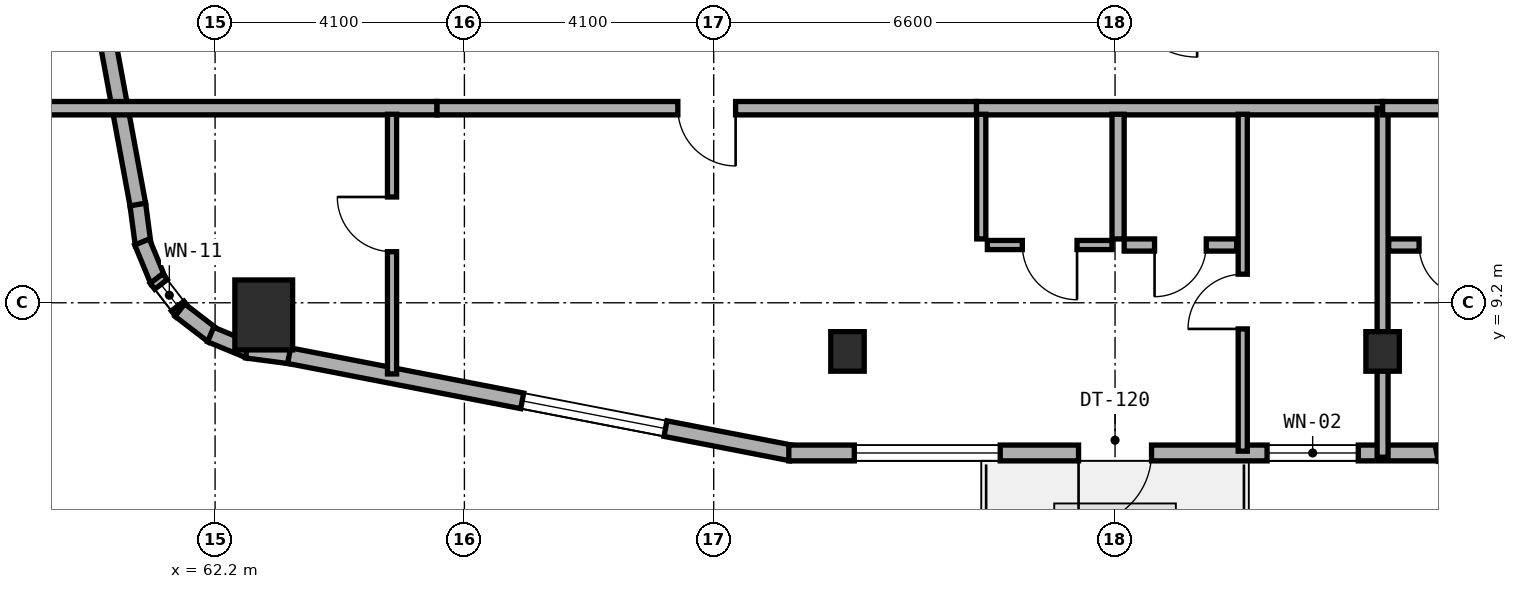
"""IFC4 building model, lengths in metres.
Left out: names, types, materials, properties, quantities, classifications, styles, units other than length and angle.
Written with IfcOpenShell. Run it as: python <this file> out.ifc"""

import sys

from ifc_helpers import new_model, si_unit, direction, frame, frame_2d, origin, origin_2d, place, context, subcontext, project, spatial, rectangle, extrude, element, fill, save


model = new_model("IFC4")
c1 = context("Model", 3, precision=1e-05, world=origin(), true_north=direction((0.0, 1.0)))
c2 = subcontext(c1, "Body", "Model", "MODEL_VIEW")
j1 = project(units=[si_unit("LENGTHUNIT", "METRE"), si_unit("PLANEANGLEUNIT", "RADIAN")], contexts=[c1])
p1 = place(None, origin())
s1 = spatial("IfcSite", under=j1, at=p1, CompositionType="ELEMENT")
p2 = place(p1, origin())
s2 = spatial("IfcBuilding", under=s1, at=p2, CompositionType="ELEMENT")
p3 = place(p2, frame((0.0, 0.0, 112.5)))
s3 = spatial("IfcBuildingStorey", under=s2, at=p3, CompositionType="ELEMENT", Elevation=112.5)
for number, where, z_axis, x_axis in (
    (1, (72.6, 8.4, 0.0), (0.0, 0.0, 1.0), (1.0, 0.0, 0.0)),
    (2, (81.4, 8.4, 0.0), (0.0, 0.0, 1.0), (1.0, 0.0, 0.0)),
):
    element("IfcColumn", number, at=place(p3, frame(where, z_axis=z_axis, x_axis=x_axis)), inside=s3, PredefinedType="COLUMN", context=c2, shape_type="SweptSolid", body=[
        extrude(rectangle(XDim=0.55, YDim=0.65, at=origin_2d()), origin(), (0.0, 0.0, 1.0), 3.5),
    ])
p4 = place(p3, frame((63.0, 9.0, 0.0), z_axis=(0.0, 0.0, 1.0), x_axis=(1.0, 0.0, 0.0)))
e3 = element("IfcColumn", 3, at=p4, inside=s3, PredefinedType="COLUMN", context=c2, shape_type="SweptSolid", body=[
    extrude(rectangle(XDim=0.95, YDim=1.15, at=origin_2d()), origin(), (0.0, 0.0, 1.0), 3.5),
])
p5 = place(p3, frame((60.928, 10.825, 0.0), z_axis=(0.0, 0.0, 1.0), x_axis=(0.131667498923, -0.991293937098, 0.0)))
e4 = element("IfcWall", 4, at=p5, inside=s3, PredefinedType="STANDARD", context=c2, shape_type="SweptSolid", body=[
    extrude(rectangle(XDim=0.677, YDim=0.26, at=frame_2d((0.338, 0.0))), origin(), (0.0, 0.0, 1.0), 3.25),
])
p6 = place(p3, frame((60.999, 10.2, 0.0), z_axis=(0.0, 0.0, 1.0), x_axis=(0.381988976935, -0.924166879681, 0.0)))
e5 = element("IfcWall", 5, at=p6, inside=s3, PredefinedType="STANDARD", context=c2, shape_type="SweptSolid", body=[
    extrude(rectangle(XDim=0.693, YDim=0.26, at=frame_2d((0.347, 0.0))), origin(), (0.0, 0.0, 1.0), 3.25),
])
p7 = place(p3, frame((61.236, 9.599, 0.0), z_axis=(0.0, 0.0, 1.0), x_axis=(0.609472651958, -0.792807092876, 0.0)))
e6 = element("IfcWall", 6, at=p7, inside=s3, PredefinedType="STANDARD", context=c2, shape_type="SweptSolid", body=[
    extrude(rectangle(XDim=0.694, YDim=0.26, at=frame_2d((0.347, 0.0))), origin(), (0.0, 0.0, 1.0), 3.25),
])
p8 = place(p7, frame((0.122, 0.0, 0.85)))
e7 = element("IfcOpeningElement", 7, at=p8, cuts=e6, PredefinedType="OPENING", context=c2, shape_type="SweptSolid", body=[
    extrude(rectangle(XDim=0.45, YDim=1.5, at=frame_2d((0.225, 0.75))), frame((0.0, 0.14, 0.0), z_axis=(0.0, -1.0, 0.0), x_axis=(1.0, 0.0, 0.0)), (0.0, 0.0, 1.0), 0.28),
])
p9 = place(p3, frame((61.621, 9.08, 0.0), z_axis=(0.0, 0.0, 1.0), x_axis=(0.792506234191, -0.609863811657, 0.0)))
e8 = element("IfcWall", 8, at=p9, inside=s3, PredefinedType="STANDARD", context=c2, shape_type="SweptSolid", body=[
    extrude(rectangle(XDim=0.694, YDim=0.26, at=frame_2d((0.347, 0.0))), origin(), (0.0, 0.0, 1.0), 3.25),
])
p10 = place(p3, frame((62.127, 8.678, 0.0), z_axis=(0.0, 0.0, 1.0), x_axis=(0.92421822618, -0.381864727877, 0.0)))
e9 = element("IfcWall", 9, at=p10, inside=s3, PredefinedType="STANDARD", context=c2, shape_type="SweptSolid", body=[
    extrude(rectangle(XDim=0.694, YDim=0.26, at=frame_2d((0.347, 0.0))), origin(), (0.0, 0.0, 1.0), 3.25),
])
p11 = place(p3, frame((62.719, 8.421, 0.0), z_axis=(0.0, 0.0, 1.0), x_axis=(0.991433279471, -0.130614135366, 0.0)))
e10 = element("IfcWall", 10, at=p11, inside=s3, PredefinedType="STANDARD", context=c2, shape_type="SweptSolid", body=[
    extrude(rectangle(XDim=0.712, YDim=0.26, at=frame_2d((0.356, 0.0))), origin(), (0.0, 0.0, 1.0), 3.25),
])
p12 = place(p3, frame((63.417, 8.33, 0.0), z_axis=(0.0, 0.0, 1.0), x_axis=(0.98174070399, -0.190224052445, 0.0)))
e11 = element("IfcWall", 11, at=p12, inside=s3, PredefinedType="STANDARD", context=c2, shape_type="SweptSolid", body=[
    extrude(rectangle(XDim=8.412, YDim=0.26, at=frame_2d((4.206, 0.0))), origin(), (0.0, 0.0, 1.0), 3.25),
])
p13 = place(p12, frame((3.905, 0.0, 0.8)))
e12 = element("IfcOpeningElement", 12, at=p13, cuts=e11, PredefinedType="OPENING", context=c2, shape_type="SweptSolid", body=[
    extrude(rectangle(XDim=2.4, YDim=1.6, at=frame_2d((1.2, 0.8))), frame((0.0, 0.14, 0.0), z_axis=(0.0, -1.0, 0.0), x_axis=(1.0, 0.0, 0.0)), (0.0, 0.0, 1.0), 0.28),
])
p14 = place(p3, frame((71.635, 6.73, 0.0), z_axis=(0.0, 0.0, 1.0), x_axis=(1.0, 0.0, 0.0)))
e13 = element("IfcWall", 13, at=p14, inside=s3, PredefinedType="STANDARD", context=c2, shape_type="SweptSolid", body=[
    extrude(rectangle(XDim=10.695, YDim=0.26, at=frame_2d((5.348, 0.0))), origin(), (0.0, 0.0, 1.0), 3.25),
])
p15 = place(p14, frame((4.765, 0.0, 0.0)))
e14 = element("IfcOpeningElement", 14, at=p15, cuts=e13, PredefinedType="OPENING", context=c2, shape_type="SweptSolid", body=[
    extrude(rectangle(XDim=1.2, YDim=2.15, at=frame_2d((0.6, 1.075))), frame((0.0, 0.14, 0.0), z_axis=(0.0, -1.0, 0.0), x_axis=(1.0, 0.0, 0.0)), (0.0, 0.0, 1.0), 0.28),
])
p16 = place(p14, frame((1.077, 0.0, 0.8)))
e15 = element("IfcOpeningElement", 15, at=p16, cuts=e13, PredefinedType="OPENING", context=c2, shape_type="SweptSolid", body=[
    extrude(rectangle(XDim=2.4, YDim=1.6, at=frame_2d((1.2, 0.8))), frame((0.0, 0.14, 0.0), z_axis=(0.0, -1.0, 0.0), x_axis=(1.0, 0.0, 0.0)), (0.0, 0.0, 1.0), 0.28),
])
p17 = place(p14, frame((7.865, 0.0, 0.85)))
e16 = element("IfcOpeningElement", 16, at=p17, cuts=e13, PredefinedType="OPENING", context=c2, shape_type="SweptSolid", body=[
    extrude(rectangle(XDim=1.5, YDim=1.5, at=frame_2d((0.75, 0.75))), frame((0.0, 0.14, 0.0), z_axis=(0.0, -1.0, 0.0), x_axis=(1.0, 0.0, 0.0)), (0.0, 0.0, 1.0), 0.28),
])
p18 = place(p3, frame((82.29, 6.723, 0.0), z_axis=(0.0, 0.0, 1.0), x_axis=(0.981733729692, 0.190260043057, 0.0)))
e17 = element("IfcWall", 17, at=p18, inside=s3, PredefinedType="STANDARD", context=c2, shape_type="SweptSolid", body=[
    extrude(rectangle(XDim=8.447, YDim=0.26, at=frame_2d((4.224, 0.0))), origin(), (0.0, 0.0, 1.0), 3.25),
])
p19 = place(p18, frame((2.608, 0.0, 0.8)))
e18 = element("IfcOpeningElement", 18, at=p19, cuts=e17, PredefinedType="OPENING", context=c2, shape_type="SweptSolid", body=[
    extrude(rectangle(XDim=2.4, YDim=1.6, at=frame_2d((1.2, 0.8))), frame((0.0, 0.14, 0.0), z_axis=(0.0, -1.0, 0.0), x_axis=(1.0, 0.0, 0.0)), (0.0, 0.0, 1.0), 0.28),
])
p20 = place(p3, frame((59.318, 19.558, 0.0), z_axis=(0.0, 0.0, 1.0), x_axis=(0.181209963057, -0.983444431215, 0.0)))
e19 = element("IfcWall", 19, at=p20, inside=s3, PredefinedType="STANDARD", context=c2, shape_type="SweptSolid", body=[
    extrude(rectangle(XDim=8.889, YDim=0.26, at=frame_2d((4.445, 0.0))), origin(), (0.0, 0.0, 1.0), 3.25),
])
p21 = place(p20, frame((1.444, 0.0, 0.8)))
e20 = element("IfcOpeningElement", 20, at=p21, cuts=e19, PredefinedType="OPENING", context=c2, shape_type="SweptSolid", body=[
    extrude(rectangle(XDim=2.4, YDim=1.6, at=frame_2d((1.2, 0.8))), frame((0.0, 0.14, 0.0), z_axis=(0.0, -1.0, 0.0), x_axis=(1.0, 0.0, 0.0)), (0.0, 0.0, 1.0), 0.28),
])
p22 = place(p3, frame((59.36, 12.4, 0.0), z_axis=(0.0, 0.0, 1.0), x_axis=(1.0, 0.0, 0.0)))
e21 = element("IfcWall", 21, at=p22, inside=s3, PredefinedType="SOLIDWALL", context=c2, shape_type="SweptSolid", body=[
    extrude(rectangle(XDim=6.49, YDim=0.22, at=frame_2d((3.245, 0.0))), origin(), (0.0, 0.0, 1.0), 2.945),
])
p23 = place(p3, frame((74.72, 12.4, 0.0), z_axis=(0.0, 0.0, 1.0), x_axis=(1.0, 0.0, 0.0)))
e22 = element("IfcWall", 22, at=p23, inside=s3, PredefinedType="SOLIDWALL", context=c2, shape_type="SweptSolid", body=[
    extrude(rectangle(XDim=6.68, YDim=0.22, at=frame_2d((3.34, 0.0))), origin(), (0.0, 0.0, 1.0), 2.825),
])
p24 = place(p3, frame((65.85, 12.4, 0.0), z_axis=(0.0, 0.0, 1.0), x_axis=(1.0, 0.0, 0.0)))
e23 = element("IfcWall", 23, at=p24, inside=s3, PredefinedType="SOLIDWALL", context=c2, shape_type="SweptSolid", body=[
    extrude(rectangle(XDim=8.87, YDim=0.22, at=frame_2d((4.435, 0.0))), origin(), (0.0, 0.0, 1.0), 2.825),
])
p25 = place(p24, frame((3.96, 0.0, 0.0)))
e24 = element("IfcOpeningElement", 24, at=p25, cuts=e23, PredefinedType="OPENING", context=c2, shape_type="SweptSolid", body=[
    extrude(rectangle(XDim=0.95, YDim=2.1, at=frame_2d((0.475, 1.05))), frame((0.0, 0.12, 0.0), z_axis=(0.0, -1.0, 0.0), x_axis=(1.0, 0.0, 0.0)), (0.0, 0.0, 1.0), 0.24),
])
p26 = place(p3, frame((65.11, 8.03, 0.0), z_axis=(0.0, 0.0, 1.0), x_axis=(0.0, 1.0, 0.0)))
e25 = element("IfcWall", 25, at=p26, inside=s3, PredefinedType="PARTITIONING", context=c2, shape_type="SweptSolid", body=[
    extrude(rectangle(XDim=4.27, YDim=0.15, at=frame_2d((2.135, 0.0))), origin(), (0.0, 0.0, 1.0), 2.945),
])
p27 = place(p26, frame((2.01, 0.0, 0.0)))
e26 = element("IfcOpeningElement", 26, at=p27, cuts=e25, PredefinedType="OPENING", context=c2, shape_type="SweptSolid", body=[
    extrude(rectangle(XDim=0.9, YDim=2.1, at=frame_2d((0.45, 1.05))), frame((0.0, 0.085, 0.0), z_axis=(0.0, -1.0, 0.0), x_axis=(1.0, 0.0, 0.0)), (0.0, 0.0, 1.0), 0.17),
])
p28 = place(p3, frame((79.1, 6.76, 0.0), z_axis=(0.0, 0.0, 1.0), x_axis=(0.0, 1.0, 0.0)))
e27 = element("IfcWall", 27, at=p28, inside=s3, PredefinedType="PARTITIONING", context=c2, shape_type="SweptSolid", body=[
    extrude(rectangle(XDim=5.54, YDim=0.15, at=frame_2d((2.77, 0.0))), origin(), (0.0, 0.0, 1.0), 2.895),
])
p29 = place(p28, frame((2.01, 0.0, 0.0)))
e28 = element("IfcOpeningElement", 28, at=p29, cuts=e27, PredefinedType="OPENING", context=c2, shape_type="SweptSolid", body=[
    extrude(rectangle(XDim=0.9, YDim=2.1, at=frame_2d((0.45, 1.05))), frame((0.0, 0.085, 0.0), z_axis=(0.0, -1.0, 0.0), x_axis=(1.0, 0.0, 0.0)), (0.0, 0.0, 1.0), 0.17),
])
p30 = place(p3, frame((77.05, 10.25, 0.0), z_axis=(0.0, 0.0, 1.0), x_axis=(0.0, 1.0, 0.0)))
e29 = element("IfcWall", 29, at=p30, inside=s3, PredefinedType="PLUMBINGWALL", context=c2, shape_type="SweptSolid", body=[
    extrude(rectangle(XDim=2.05, YDim=0.2, at=frame_2d((1.025, 0.0))), origin(), (0.0, 0.0, 1.0), 2.895),
])
p31 = place(p3, frame((74.8, 10.25, 0.0), z_axis=(0.0, 0.0, 1.0), x_axis=(0.0, 1.0, 0.0)))
e30 = element("IfcWall", 30, at=p31, inside=s3, PredefinedType="PARTITIONING", context=c2, shape_type="SweptSolid", body=[
    extrude(rectangle(XDim=2.05, YDim=0.15, at=frame_2d((1.025, 0.0))), origin(), (0.0, 0.0, 1.0), 2.895),
])
p32 = place(p3, frame((77.15, 10.15, 0.0), z_axis=(0.0, 0.0, 1.0), x_axis=(1.0, 0.0, 0.0)))
e31 = element("IfcWall", 31, at=p32, inside=s3, PredefinedType="PLUMBINGWALL", context=c2, shape_type="SweptSolid", body=[
    extrude(rectangle(XDim=1.85, YDim=0.2, at=frame_2d((0.925, 0.0))), origin(), (0.0, 0.0, 1.0), 3.22),
])
p33 = place(p32, frame((0.5, 0.0, 0.0)))
e32 = element("IfcOpeningElement", 32, at=p33, cuts=e31, PredefinedType="OPENING", context=c2, shape_type="SweptSolid", body=[
    extrude(rectangle(XDim=0.85, YDim=2.1, at=frame_2d((0.425, 1.05))), frame((0.0, 0.11, 0.0), z_axis=(0.0, -1.0, 0.0), x_axis=(1.0, 0.0, 0.0)), (0.0, 0.0, 1.0), 0.22),
])
p34 = place(p3, frame((74.9, 10.15, 0.0), z_axis=(0.0, 0.0, 1.0), x_axis=(1.0, 0.0, 0.0)))
e33 = element("IfcWall", 33, at=p34, inside=s3, PredefinedType="PARTITIONING", context=c2, shape_type="SweptSolid", body=[
    extrude(rectangle(XDim=2.05, YDim=0.15, at=frame_2d((1.025, 0.0))), origin(), (0.0, 0.0, 1.0), 3.22),
])
p35 = place(p34, frame((0.575, 0.0, 0.0)))
e34 = element("IfcOpeningElement", 34, at=p35, cuts=e33, PredefinedType="OPENING", context=c2, shape_type="SweptSolid", body=[
    extrude(rectangle(XDim=0.9, YDim=2.1, at=frame_2d((0.45, 1.05))), frame((0.0, 0.085, 0.0), z_axis=(0.0, -1.0, 0.0), x_axis=(1.0, 0.0, 0.0)), (0.0, 0.0, 1.0), 0.17),
])
p36 = place(p3, frame((81.4, 6.66, 0.0), z_axis=(0.0, 0.0, 1.0), x_axis=(0.0, 1.0, 0.0)))
e35 = element("IfcWall", 35, at=p36, inside=s3, PredefinedType="SOLIDWALL", context=c2, shape_type="SweptSolid", body=[
    extrude(rectangle(XDim=5.74, YDim=0.18, at=frame_2d((2.87, 0.0))), origin(), (0.0, 0.0, 1.0), 2.825),
])
p37 = place(p3, frame((81.4, 12.4, 0.0), z_axis=(0.0, 0.0, 1.0), x_axis=(1.0, 0.0, 0.0)))
e36 = element("IfcWall", 36, at=p37, inside=s3, PredefinedType="SOLIDWALL", context=c2, shape_type="SweptSolid", body=[
    extrude(rectangle(XDim=4.38, YDim=0.22, at=frame_2d((2.19, 0.0))), origin(), (0.0, 0.0, 1.0), 2.825),
])
p38 = place(p3, frame((81.5, 10.15, 0.0), z_axis=(0.0, 0.0, 1.0), x_axis=(1.0, 0.0, 0.0)))
e37 = element("IfcWall", 37, at=p38, inside=s3, PredefinedType="PLUMBINGWALL", context=c2, shape_type="SweptSolid", body=[
    extrude(rectangle(XDim=1.85, YDim=0.2, at=frame_2d((0.925, 0.0))), origin(), (0.0, 0.0, 1.0), 2.825),
])
p39 = place(p38, frame((0.5, 0.0, 0.0)))
e38 = element("IfcOpeningElement", 38, at=p39, cuts=e37, PredefinedType="OPENING", context=c2, shape_type="SweptSolid", body=[
    extrude(rectangle(XDim=0.85, YDim=2.1, at=frame_2d((0.425, 1.05))), frame((0.0, 0.11, 0.0), z_axis=(0.0, -1.0, 0.0), x_axis=(1.0, 0.0, 0.0)), (0.0, 0.0, 1.0), 0.22),
])
p40 = place(p13, origin())
e39 = element("IfcWindow", 39, at=p40, inside=s3, PartitioningType="SINGLE_PANEL", PredefinedType="WINDOW", context=c2, shape_type="SweptSolid", body=[
    extrude(rectangle(XDim=2.4, YDim=1.6, at=frame_2d((1.2, 0.8))), frame((0.0, 0.03, 0.0), z_axis=(0.0, -1.0, 0.0), x_axis=(1.0, 0.0, 0.0)), (0.0, 0.0, 1.0), 0.06),
])
fill(e12, e39)
p41 = place(p15, frame((1.2, 0.0, 0.0), z_axis=(0.0, 0.0, 1.0), x_axis=(-1.0, 0.0, 0.0)))
e40 = element("IfcDoor", 40, at=p41, inside=s3, OperationType="SINGLE_SWING_RIGHT", PredefinedType="DOOR", context=c2, shape_type="SweptSolid", body=[
    extrude(rectangle(XDim=1.2, YDim=2.15, at=frame_2d((0.6, 1.075))), frame((0.0, 0.025, 0.0), z_axis=(0.0, -1.0, 0.0), x_axis=(1.0, 0.0, 0.0)), (0.0, 0.0, 1.0), 0.05),
])
fill(e14, e40)
p42 = place(p16, origin())
e41 = element("IfcWindow", 41, at=p42, inside=s3, PartitioningType="SINGLE_PANEL", PredefinedType="WINDOW", context=c2, shape_type="SweptSolid", body=[
    extrude(rectangle(XDim=2.4, YDim=1.6, at=frame_2d((1.2, 0.8))), frame((0.0, 0.03, 0.0), z_axis=(0.0, -1.0, 0.0), x_axis=(1.0, 0.0, 0.0)), (0.0, 0.0, 1.0), 0.06),
])
fill(e15, e41)
p43 = place(p17, origin())
e42 = element("IfcWindow", 42, at=p43, inside=s3, PartitioningType="SINGLE_PANEL", PredefinedType="WINDOW", context=c2, shape_type="SweptSolid", body=[
    extrude(rectangle(XDim=1.5, YDim=1.5, at=frame_2d((0.75, 0.75))), frame((0.0, 0.03, 0.0), z_axis=(0.0, -1.0, 0.0), x_axis=(1.0, 0.0, 0.0)), (0.0, 0.0, 1.0), 0.06),
])
fill(e16, e42)
p44 = place(p8, origin())
e43 = element("IfcWindow", 43, at=p44, inside=s3, PartitioningType="SINGLE_PANEL", PredefinedType="WINDOW", context=c2, shape_type="SweptSolid", body=[
    extrude(rectangle(XDim=0.45, YDim=1.5, at=frame_2d((0.225, 0.75))), frame((0.0, 0.03, 0.0), z_axis=(0.0, -1.0, 0.0), x_axis=(1.0, 0.0, 0.0)), (0.0, 0.0, 1.0), 0.06),
])
fill(e7, e43)
p45 = place(p25, frame((0.95, 0.0, 0.0), z_axis=(0.0, 0.0, 1.0), x_axis=(-1.0, 0.0, 0.0)))
e44 = element("IfcDoor", 44, at=p45, inside=s3, OperationType="SINGLE_SWING_LEFT", PredefinedType="DOOR", context=c2, shape_type="SweptSolid", body=[
    extrude(rectangle(XDim=0.95, YDim=2.1, at=frame_2d((0.475, 1.05))), frame((0.0, 0.025, 0.0), z_axis=(0.0, -1.0, 0.0), x_axis=(1.0, 0.0, 0.0)), (0.0, 0.0, 1.0), 0.05),
])
fill(e24, e44)
p46 = place(p27, origin())
e45 = element("IfcDoor", 45, at=p46, inside=s3, OperationType="SINGLE_SWING_RIGHT", PredefinedType="DOOR", context=c2, shape_type="SweptSolid", body=[
    extrude(rectangle(XDim=0.9, YDim=2.1, at=frame_2d((0.45, 1.05))), frame((0.0, 0.025, 0.0), z_axis=(0.0, -1.0, 0.0), x_axis=(1.0, 0.0, 0.0)), (0.0, 0.0, 1.0), 0.05),
])
fill(e26, e45)
p47 = place(p29, origin())
e46 = element("IfcDoor", 46, at=p47, inside=s3, OperationType="SINGLE_SWING_LEFT", PredefinedType="DOOR", context=c2, shape_type="SweptSolid", body=[
    extrude(rectangle(XDim=0.9, YDim=2.1, at=frame_2d((0.45, 1.05))), frame((0.0, 0.025, 0.0), z_axis=(0.0, -1.0, 0.0), x_axis=(1.0, 0.0, 0.0)), (0.0, 0.0, 1.0), 0.05),
])
fill(e28, e46)
p48 = place(p33, frame((0.85, 0.0, 0.0), z_axis=(0.0, 0.0, 1.0), x_axis=(-1.0, 0.0, 0.0)))
e47 = element("IfcDoor", 47, at=p48, inside=s3, OperationType="SINGLE_SWING_RIGHT", PredefinedType="DOOR", context=c2, shape_type="SweptSolid", body=[
    extrude(rectangle(XDim=0.85, YDim=2.1, at=frame_2d((0.425, 1.05))), frame((0.0, 0.025, 0.0), z_axis=(0.0, -1.0, 0.0), x_axis=(1.0, 0.0, 0.0)), (0.0, 0.0, 1.0), 0.05),
])
fill(e32, e47)
p49 = place(p35, frame((0.9, 0.0, 0.0), z_axis=(0.0, 0.0, 1.0), x_axis=(-1.0, 0.0, 0.0)))
e48 = element("IfcDoor", 48, at=p49, inside=s3, OperationType="SINGLE_SWING_LEFT", PredefinedType="DOOR", context=c2, shape_type="SweptSolid", body=[
    extrude(rectangle(XDim=0.9, YDim=2.1, at=frame_2d((0.45, 1.05))), frame((0.0, 0.025, 0.0), z_axis=(0.0, -1.0, 0.0), x_axis=(1.0, 0.0, 0.0)), (0.0, 0.0, 1.0), 0.05),
])
fill(e34, e48)
p50 = place(p39, frame((0.85, 0.0, 0.0), z_axis=(0.0, 0.0, 1.0), x_axis=(-1.0, 0.0, 0.0)))
e49 = element("IfcDoor", 49, at=p50, inside=s3, OperationType="SINGLE_SWING_LEFT", PredefinedType="DOOR", context=c2, shape_type="SweptSolid", body=[
    extrude(rectangle(XDim=0.85, YDim=2.1, at=frame_2d((0.425, 1.05))), frame((0.0, 0.025, 0.0), z_axis=(0.0, -1.0, 0.0), x_axis=(1.0, 0.0, 0.0)), (0.0, 0.0, 1.0), 0.05),
])
fill(e38, e49)
save(model, sys.argv[1])
